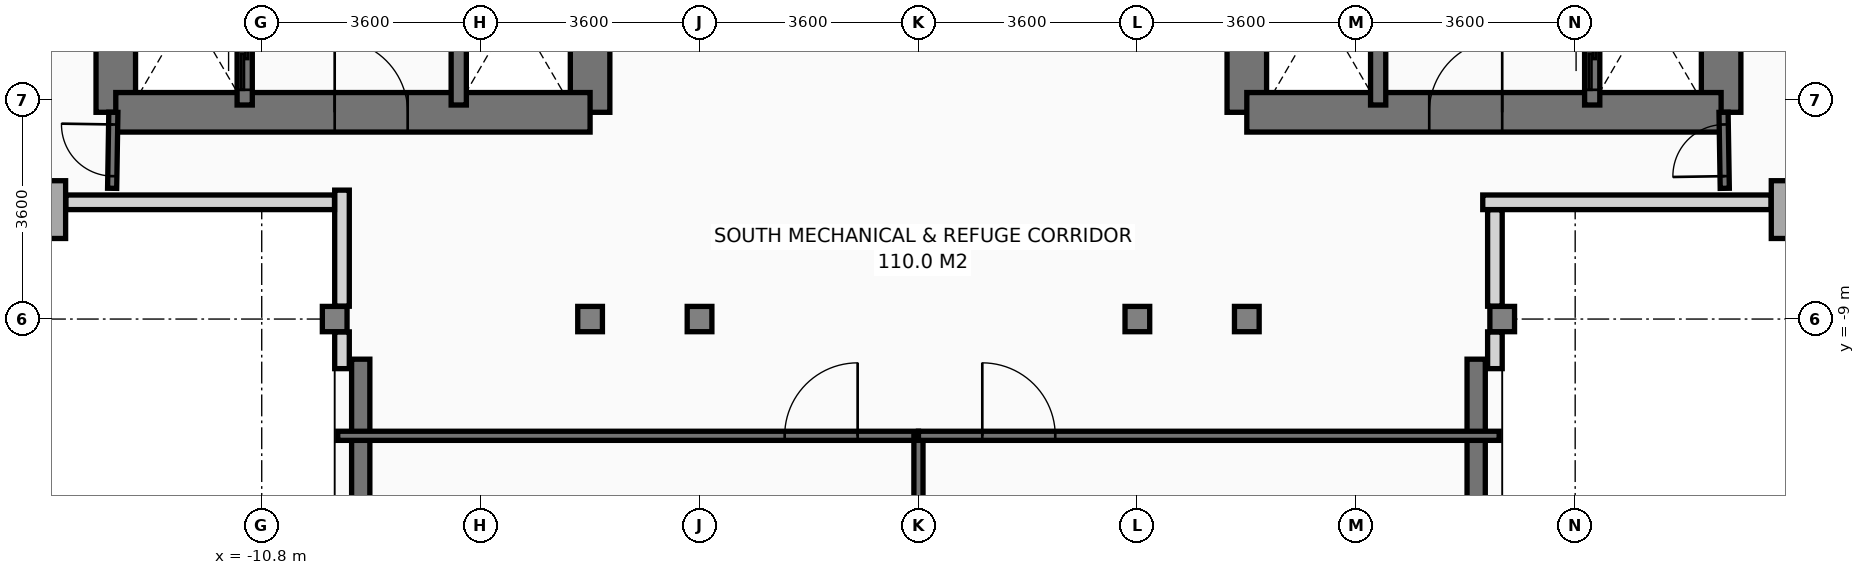
"""IFC4 building model, lengths in metres.
Left out: names, types, materials, properties, quantities, classifications, styles, units other than length and angle.
Written with IfcOpenShell. Run it as: python <this file> out.ifc"""

import sys

from ifc_helpers import new_model, si_unit, direction, frame, frame_2d, origin, origin_2d, place, context, subcontext, project, spatial, rectangle, i_section, extrude, source, transform, mapped, element, fill, save


model = new_model("IFC4")
c1 = context("Model", 3, precision=1e-05, world=origin(), true_north=direction((0.0, 1.0)))
c2 = subcontext(c1, "Body", "Model", "MODEL_VIEW")
j1 = project(units=[si_unit("LENGTHUNIT", "METRE"), si_unit("PLANEANGLEUNIT", "RADIAN")], contexts=[c1])
p1 = place(None, origin())
s1 = spatial("IfcSite", under=j1, at=p1, CompositionType="ELEMENT")
p2 = place(p1, origin())
s2 = spatial("IfcBuilding", under=s1, at=p2, CompositionType="ELEMENT")
p3 = place(p2, frame((0.0, 0.0, 25.2)))
s3 = spatial("IfcBuildingStorey", under=s2, at=p3, CompositionType="ELEMENT", Elevation=25.2)
m1 = source(origin(), c2, "Body", "SweptSolid", [
    extrude(rectangle(XDim=0.75, YDim=0.95, at=origin_2d()), origin(), (0.0, 0.0, 1.0), 5.2),
])
p4 = place(p3, frame((-14.4, -7.2, 0.0), z_axis=(0.0, 0.0, 1.0), x_axis=(1.0, 0.0, 0.0)))
e1 = element("IfcColumn", 1, at=p4, inside=s3, PredefinedType="COLUMN", context=c2, shape_type="MappedRepresentation", body=[
    mapped(m1, transform((0.0, 0.0, 0.0), x_axis=(1.0, 0.0, 0.0), y_axis=(0.0, 1.0, 0.0), z_axis=(0.0, 0.0, 1.0), scale=1.0)),
])
m2 = source(origin(), c2, "Body", "SweptSolid", [
    extrude(i_section(OverallWidth=0.406, OverallDepth=0.416, WebThickness=0.024, FlangeThickness=0.039, at=origin_2d()), origin(), (0.0, 0.0, 1.0), 5.2),
])
for number, where, z_axis, x_axis in (
    (2, (-9.6, -9.0, 0.0), (0.0, 0.0, 1.0), (1.0, 0.0, 0.0)),
    (3, (-5.4, -9.0, 0.0), (0.0, 0.0, 1.0), (1.0, 0.0, 0.0)),
    (4, (-3.6, -9.0, 0.0), (0.0, 0.0, 1.0), (1.0, 0.0, 0.0)),
    (5, (3.6, -9.0, 0.0), (0.0, 0.0, 1.0), (1.0, 0.0, 0.0)),
    (6, (5.4, -9.0, 0.0), (0.0, 0.0, 1.0), (1.0, 0.0, 0.0)),
    (7, (9.6, -9.0, 0.0), (0.0, 0.0, 1.0), (1.0, 0.0, 0.0)),
):
    element("IfcColumn", number, at=place(p3, frame(where, z_axis=z_axis, x_axis=x_axis)), inside=s3, PredefinedType="COLUMN", context=c2, shape_type="MappedRepresentation", body=[
        mapped(m2, transform((0.0, 0.0, 0.0), x_axis=(1.0, 0.0, 0.0), y_axis=(0.0, 1.0, 0.0), z_axis=(0.0, 0.0, 1.0), scale=1.0)),
    ])
p5 = place(p3, frame((14.4, -7.2, 0.0), z_axis=(0.0, 0.0, 1.0), x_axis=(1.0, 0.0, 0.0)))
e8 = element("IfcColumn", 8, at=p5, inside=s3, PredefinedType="COLUMN", context=c2, shape_type="MappedRepresentation", body=[
    mapped(m1, transform((0.0, 0.0, 0.0), x_axis=(1.0, 0.0, 0.0), y_axis=(0.0, 1.0, 0.0), z_axis=(0.0, 0.0, 1.0), scale=1.0)),
])
for number, where, z_axis, x_axis in (
    (9, (-9.172, -9.66, 0.0), (0.0, 0.0, 1.0), (0.0, -1.0, 0.0)),
    (10, (9.172, -13.83, 0.0), (0.0, 0.0, 1.0), (0.0, 1.0, 0.0)),
):
    element("IfcWall", number, at=place(p3, frame(where, z_axis=z_axis, x_axis=x_axis)), inside=s3, PredefinedType="SOLIDWALL", context=c2, shape_type="SweptSolid", body=[
        extrude(rectangle(XDim=4.17, YDim=0.3, at=frame_2d((2.085, 0.0))), origin(), (0.0, 0.0, 1.0), 5.2),
    ])
p6 = place(p3, frame((14.022, -7.08, 0.0), z_axis=(0.0, 0.0, 1.0), x_axis=(-1.0, 0.0, 0.0)))
e11 = element("IfcWall", 11, at=p6, inside=s3, PredefinedType="PARAPET", context=c2, shape_type="SweptSolid", body=[
    extrude(rectangle(XDim=4.742, YDim=0.24, at=frame_2d((2.371, 0.0))), origin(), (0.0, 0.0, 1.0), 1.15),
])
p7 = place(p3, frame((9.48, -7.203, 0.0), z_axis=(0.0, 0.0, 1.0), x_axis=(0.0, -1.0, 0.0)))
e12 = element("IfcWall", 12, at=p7, inside=s3, PredefinedType="PARAPET", context=c2, shape_type="SweptSolid", body=[
    extrude(rectangle(XDim=1.586, YDim=0.24, at=frame_2d((0.793, 0.0))), origin(), (0.0, 0.0, 1.0), 1.15),
])
for number, where, z_axis, x_axis in (
    (13, (9.48, -9.211, 0.0), (0.0, 0.0, 1.0), (0.0, -1.0, 0.0)),
    (14, (-9.48, -9.815, 0.0), (0.0, 0.0, 1.0), (0.0, 1.0, 0.0)),
):
    element("IfcWall", number, at=place(p3, frame(where, z_axis=z_axis, x_axis=x_axis)), inside=s3, PredefinedType="PARAPET", context=c2, shape_type="SweptSolid", body=[
        extrude(rectangle(XDim=0.604, YDim=0.24, at=frame_2d((0.302, 0.0))), origin(), (0.0, 0.0, 1.0), 1.15),
    ])
p8 = place(p3, frame((-9.48, -8.789, 0.0), z_axis=(0.0, 0.0, 1.0), x_axis=(0.0, 1.0, 0.0)))
e15 = element("IfcWall", 15, at=p8, inside=s3, PredefinedType="PARAPET", context=c2, shape_type="SweptSolid", body=[
    extrude(rectangle(XDim=1.909, YDim=0.24, at=frame_2d((0.955, 0.0))), origin(), (0.0, 0.0, 1.0), 1.15),
])
p9 = place(p3, frame((-9.603, -7.08, 0.0), z_axis=(0.0, 0.0, 1.0), x_axis=(-1.0, 0.0, 0.0)))
e16 = element("IfcWall", 16, at=p9, inside=s3, PredefinedType="PARAPET", context=c2, shape_type="SweptSolid", body=[
    extrude(rectangle(XDim=4.419, YDim=0.24, at=frame_2d((2.209, 0.0))), origin(), (0.0, 0.0, 1.0), 1.15),
])
p10 = place(p3, frame((-13.2, -5.6, 0.0), z_axis=(0.0, 0.0, 1.0), x_axis=(0.0, 1.0, 0.0)))
e17 = element("IfcWall", 17, at=p10, inside=s3, PredefinedType="SHEAR", context=c2, shape_type="SweptSolid", body=[
    extrude(rectangle(XDim=11.2, YDim=0.65, at=frame_2d((5.6, 0.0))), origin(), (0.0, 0.0, 1.0), 5.2),
])
p11 = place(p3, frame((-5.4, -5.6, 0.0), z_axis=(0.0, 0.0, 1.0), x_axis=(0.0, 1.0, 0.0)))
e18 = element("IfcWall", 18, at=p11, inside=s3, PredefinedType="SHEAR", context=c2, shape_type="SweptSolid", body=[
    extrude(rectangle(XDim=12.5, YDim=0.65, at=frame_2d((6.25, 0.0))), origin(), (0.0, 0.0, 1.0), 5.2),
])
p12 = place(p11, frame((4.55, 0.0, 0.0)))
e19 = element("IfcOpeningElement", 19, at=p12, cuts=e18, PredefinedType="OPENING", context=c2, shape_type="SweptSolid", body=[
    extrude(rectangle(XDim=1.2, YDim=2.2, at=frame_2d((0.6, 1.1))), frame((0.0, 0.335, 0.0), z_axis=(0.0, -1.0, 0.0), x_axis=(1.0, 0.0, 0.0)), (0.0, 0.0, 1.0), 0.67),
])
p13 = place(p3, frame((-13.2, -5.6, 0.0), z_axis=(0.0, 0.0, 1.0), x_axis=(1.0, 0.0, 0.0)))
e20 = element("IfcWall", 20, at=p13, inside=s3, PredefinedType="SHEAR", context=c2, shape_type="SweptSolid", body=[
    extrude(rectangle(XDim=7.8, YDim=0.65, at=frame_2d((3.9, 0.0))), origin(), (0.0, 0.0, 1.0), 5.2),
])
p14 = place(p13, frame((3.6, 0.0, 0.0)))
e21 = element("IfcOpeningElement", 21, at=p14, cuts=e20, PredefinedType="OPENING", context=c2, shape_type="SweptSolid", body=[
    extrude(rectangle(XDim=1.2, YDim=2.2, at=frame_2d((0.6, 1.1))), frame((0.0, 0.335, 0.0), z_axis=(0.0, -1.0, 0.0), x_axis=(1.0, 0.0, 0.0)), (0.0, 0.0, 1.0), 0.67),
])
p15 = place(p3, frame((13.2, -5.6, 0.0), z_axis=(0.0, 0.0, 1.0), x_axis=(0.0, 1.0, 0.0)))
e22 = element("IfcWall", 22, at=p15, inside=s3, PredefinedType="SHEAR", context=c2, shape_type="SweptSolid", body=[
    extrude(rectangle(XDim=11.2, YDim=0.65, at=frame_2d((5.6, 0.0))), origin(), (0.0, 0.0, 1.0), 5.2),
])
p16 = place(p3, frame((5.4, -5.6, 0.0), z_axis=(0.0, 0.0, 1.0), x_axis=(0.0, 1.0, 0.0)))
e23 = element("IfcWall", 23, at=p16, inside=s3, PredefinedType="SHEAR", context=c2, shape_type="SweptSolid", body=[
    extrude(rectangle(XDim=12.5, YDim=0.65, at=frame_2d((6.25, 0.0))), origin(), (0.0, 0.0, 1.0), 5.2),
])
p17 = place(p16, frame((4.55, 0.0, 0.0)))
e24 = element("IfcOpeningElement", 24, at=p17, cuts=e23, PredefinedType="OPENING", context=c2, shape_type="SweptSolid", body=[
    extrude(rectangle(XDim=1.2, YDim=2.2, at=frame_2d((0.6, 1.1))), frame((0.0, 0.335, 0.0), z_axis=(0.0, -1.0, 0.0), x_axis=(1.0, 0.0, 0.0)), (0.0, 0.0, 1.0), 0.67),
])
p18 = place(p16, frame((7.88, 0.0, 0.0)))
e25 = element("IfcOpeningElement", 25, at=p18, cuts=e23, PredefinedType="OPENING", context=c2, shape_type="SweptSolid", body=[
    extrude(rectangle(XDim=0.8, YDim=2.1, at=frame_2d((0.4, 1.05))), frame((0.0, 0.335, 0.0), z_axis=(0.0, -1.0, 0.0), x_axis=(1.0, 0.0, 0.0)), (0.0, 0.0, 1.0), 0.67),
])
p19 = place(p3, frame((5.4, -5.6, 0.0), z_axis=(0.0, 0.0, 1.0), x_axis=(1.0, 0.0, 0.0)))
e26 = element("IfcWall", 26, at=p19, inside=s3, PredefinedType="SHEAR", context=c2, shape_type="SweptSolid", body=[
    extrude(rectangle(XDim=7.8, YDim=0.65, at=frame_2d((3.9, 0.0))), origin(), (0.0, 0.0, 1.0), 5.2),
])
p20 = place(p19, frame((3.0, 0.0, 0.0)))
e27 = element("IfcOpeningElement", 27, at=p20, cuts=e26, PredefinedType="OPENING", context=c2, shape_type="SweptSolid", body=[
    extrude(rectangle(XDim=1.2, YDim=2.2, at=frame_2d((0.6, 1.1))), frame((0.0, 0.335, 0.0), z_axis=(0.0, -1.0, 0.0), x_axis=(1.0, 0.0, 0.0)), (0.0, 0.0, 1.0), 0.67),
])
p21 = place(p3, frame((-11.08, -5.48, 0.0), z_axis=(0.0, 0.0, 1.0), x_axis=(0.0, 1.0, 0.0)))
e28 = element("IfcWall", 28, at=p21, inside=s3, PredefinedType="SOLIDWALL", context=c2, shape_type="SweptSolid", body=[
    extrude(rectangle(XDim=1.6, YDim=0.25, at=frame_2d((0.8, 0.0))), origin(), (0.0, 0.0, 1.0), 5.2),
])
p22 = place(p21, frame((0.25, 0.0, 0.0)))
e29 = element("IfcOpeningElement", 29, at=p22, cuts=e28, PredefinedType="OPENING", context=c2, shape_type="SweptSolid", body=[
    extrude(rectangle(XDim=1.1, YDim=2.2, at=frame_2d((0.55, 1.1))), frame((0.0, 0.135, 0.0), z_axis=(0.0, -1.0, 0.0), x_axis=(1.0, 0.0, 0.0)), (0.0, 0.0, 1.0), 0.27),
])
p23 = place(p3, frame((11.08, -5.48, 0.0), z_axis=(0.0, 0.0, 1.0), x_axis=(0.0, 1.0, 0.0)))
e30 = element("IfcWall", 30, at=p23, inside=s3, PredefinedType="SOLIDWALL", context=c2, shape_type="SweptSolid", body=[
    extrude(rectangle(XDim=1.6, YDim=0.25, at=frame_2d((0.8, 0.0))), origin(), (0.0, 0.0, 1.0), 5.2),
])
p24 = place(p23, frame((0.25, 0.0, 0.0)))
e31 = element("IfcOpeningElement", 31, at=p24, cuts=e30, PredefinedType="OPENING", context=c2, shape_type="SweptSolid", body=[
    extrude(rectangle(XDim=1.1, YDim=2.2, at=frame_2d((0.55, 1.1))), frame((0.0, 0.135, 0.0), z_axis=(0.0, -1.0, 0.0), x_axis=(1.0, 0.0, 0.0)), (0.0, 0.0, 1.0), 0.27),
])
for number, where, z_axis, x_axis in (
    (32, (-7.56, -5.48, 0.0), (0.0, 0.0, 1.0), (0.0, 1.0, 0.0)),
    (33, (7.56, -5.48, 0.0), (0.0, 0.0, 1.0), (0.0, 1.0, 0.0)),
):
    element("IfcWall", number, at=place(p3, frame(where, z_axis=z_axis, x_axis=x_axis)), inside=s3, PredefinedType="SOLIDWALL", context=c2, shape_type="SweptSolid", body=[
        extrude(rectangle(XDim=1.6, YDim=0.25, at=frame_2d((0.8, 0.0))), origin(), (0.0, 0.0, 1.0), 5.2),
    ])
p25 = place(p3, frame((-13.26, -6.85, 0.0), z_axis=(0.0, 0.0, 1.0), x_axis=(0.016013571389, 0.999871774545, 0.0)))
e34 = element("IfcWall", 34, at=p25, inside=s3, PredefinedType="PARTITIONING", context=c2, shape_type="SweptSolid", body=[
    extrude(rectangle(XDim=1.25, YDim=0.15, at=frame_2d((0.625, 0.0))), origin(), (0.0, 0.0, 1.0), 5.2),
])
p26 = place(p25, frame((0.2, 0.0, 0.0)))
e35 = element("IfcOpeningElement", 35, at=p26, cuts=e34, PredefinedType="OPENING", context=c2, shape_type="SweptSolid", body=[
    extrude(rectangle(XDim=0.85, YDim=2.1, at=frame_2d((0.425, 1.05))), frame((0.0, 0.085, 0.0), z_axis=(0.0, -1.0, 0.0), x_axis=(1.0, 0.0, 0.0)), (0.0, 0.0, 1.0), 0.17),
])
p27 = place(p3, frame((13.26, -6.85, 0.0), z_axis=(0.0, 0.0, 1.0), x_axis=(-0.016013571389, 0.999871774545, 0.0)))
e36 = element("IfcWall", 36, at=p27, inside=s3, PredefinedType="PARTITIONING", context=c2, shape_type="SweptSolid", body=[
    extrude(rectangle(XDim=1.25, YDim=0.15, at=frame_2d((0.625, 0.0))), origin(), (0.0, 0.0, 1.0), 5.2),
])
p28 = place(p27, frame((0.2, 0.0, 0.0)))
e37 = element("IfcOpeningElement", 37, at=p28, cuts=e36, PredefinedType="OPENING", context=c2, shape_type="SweptSolid", body=[
    extrude(rectangle(XDim=0.85, YDim=2.1, at=frame_2d((0.425, 1.05))), frame((0.0, 0.085, 0.0), z_axis=(0.0, -1.0, 0.0), x_axis=(1.0, 0.0, 0.0)), (0.0, 0.0, 1.0), 0.17),
])
p29 = place(p3, frame((-9.55, -10.92, 0.0), z_axis=(0.0, 0.0, 1.0), x_axis=(1.0, 0.0, 0.0)))
e38 = element("IfcWall", 38, at=p29, inside=s3, PredefinedType="PARTITIONING", context=c2, shape_type="SweptSolid", body=[
    extrude(rectangle(XDim=9.55, YDim=0.15, at=frame_2d((4.775, 0.0))), origin(), (0.0, 0.0, 1.0), 5.2),
])
p30 = place(p29, frame((7.35, 0.0, 0.0)))
e39 = element("IfcOpeningElement", 39, at=p30, cuts=e38, PredefinedType="OPENING", context=c2, shape_type="SweptSolid", body=[
    extrude(rectangle(XDim=1.2, YDim=2.2, at=frame_2d((0.6, 1.1))), frame((0.0, 0.085, 0.0), z_axis=(0.0, -1.0, 0.0), x_axis=(1.0, 0.0, 0.0)), (0.0, 0.0, 1.0), 0.17),
])
p31 = place(p3, frame((0.0, -22.85, 0.0), z_axis=(0.0, 0.0, 1.0), x_axis=(0.0, 1.0, 0.0)))
e40 = element("IfcWall", 40, at=p31, inside=s3, PredefinedType="PARTITIONING", context=c2, shape_type="SweptSolid", body=[
    extrude(rectangle(XDim=11.93, YDim=0.15, at=frame_2d((5.965, 0.0))), origin(), (0.0, 0.0, 1.0), 4.386),
])
p32 = place(p3, frame((0.0, -10.92, 0.0), z_axis=(0.0, 0.0, 1.0), x_axis=(1.0, 0.0, 0.0)))
e41 = element("IfcWall", 41, at=p32, inside=s3, PredefinedType="PARTITIONING", context=c2, shape_type="SweptSolid", body=[
    extrude(rectangle(XDim=9.55, YDim=0.15, at=frame_2d((4.775, 0.0))), origin(), (0.0, 0.0, 1.0), 5.2),
])
p33 = place(p32, frame((1.05, 0.0, 0.0)))
e42 = element("IfcOpeningElement", 42, at=p33, cuts=e41, PredefinedType="OPENING", context=c2, shape_type="SweptSolid", body=[
    extrude(rectangle(XDim=1.2, YDim=2.2, at=frame_2d((0.6, 1.1))), frame((0.0, 0.085, 0.0), z_axis=(0.0, -1.0, 0.0), x_axis=(1.0, 0.0, 0.0)), (0.0, 0.0, 1.0), 0.17),
])
m3 = source(origin(), c2, "Body", "SweptSolid", [
    extrude(rectangle(XDim=1.2, YDim=2.2, at=frame_2d((0.6, 1.1))), frame((0.0, 0.025, 0.0), z_axis=(0.0, -1.0, 0.0), x_axis=(1.0, 0.0, 0.0)), (0.0, 0.0, 1.0), 0.05),
])
p34 = place(p14, origin())
e43 = element("IfcDoor", 43, at=p34, inside=s3, OperationType="SINGLE_SWING_LEFT", PredefinedType="DOOR", context=c2, shape_type="MappedRepresentation", body=[
    mapped(m3, transform((0.0, 0.0, 0.0), x_axis=(1.0, 0.0, 0.0), y_axis=(0.0, 1.0, 0.0), z_axis=(0.0, 0.0, 1.0), scale=1.0)),
])
fill(e21, e43)
p35 = place(p20, origin())
e44 = element("IfcDoor", 44, at=p35, inside=s3, OperationType="SINGLE_SWING_RIGHT", PredefinedType="DOOR", context=c2, shape_type="MappedRepresentation", body=[
    mapped(m3, transform((0.0, 0.0, 0.0), x_axis=(1.0, 0.0, 0.0), y_axis=(0.0, 1.0, 0.0), z_axis=(0.0, 0.0, 1.0), scale=1.0)),
])
fill(e27, e44)
m4 = source(origin(), c2, "Body", "SweptSolid", [
    extrude(rectangle(XDim=1.1, YDim=2.2, at=frame_2d((0.55, 1.1))), frame((0.0, 0.025, 0.0), z_axis=(0.0, -1.0, 0.0), x_axis=(1.0, 0.0, 0.0)), (0.0, 0.0, 1.0), 0.05),
])
p36 = place(p22, origin())
e45 = element("IfcDoor", 45, at=p36, inside=s3, OperationType="SLIDING_TO_LEFT", PredefinedType="DOOR", context=c2, shape_type="MappedRepresentation", body=[
    mapped(m4, transform((0.0, 0.0, 0.0), x_axis=(1.0, 0.0, 0.0), y_axis=(0.0, 1.0, 0.0), z_axis=(0.0, 0.0, 1.0), scale=1.0)),
])
fill(e29, e45)
p37 = place(p24, origin())
e46 = element("IfcDoor", 46, at=p37, inside=s3, OperationType="SLIDING_TO_LEFT", PredefinedType="DOOR", context=c2, shape_type="MappedRepresentation", body=[
    mapped(m4, transform((0.0, 0.0, 0.0), x_axis=(1.0, 0.0, 0.0), y_axis=(0.0, 1.0, 0.0), z_axis=(0.0, 0.0, 1.0), scale=1.0)),
])
fill(e31, e46)
m5 = source(origin(), c2, "Body", "SweptSolid", [
    extrude(rectangle(XDim=0.85, YDim=2.1, at=frame_2d((0.425, 1.05))), frame((0.0, 0.025, 0.0), z_axis=(0.0, -1.0, 0.0), x_axis=(1.0, 0.0, 0.0)), (0.0, 0.0, 1.0), 0.05),
])
p38 = place(p26, origin())
e47 = element("IfcDoor", 47, at=p38, inside=s3, OperationType="SINGLE_SWING_RIGHT", PredefinedType="DOOR", context=c2, shape_type="MappedRepresentation", body=[
    mapped(m5, transform((0.0, 0.0, 0.0), x_axis=(1.0, 0.0, 0.0), y_axis=(0.0, 1.0, 0.0), z_axis=(0.0, 0.0, 1.0), scale=1.0)),
])
fill(e35, e47)
p39 = place(p28, origin())
e48 = element("IfcDoor", 48, at=p39, inside=s3, OperationType="SINGLE_SWING_LEFT", PredefinedType="DOOR", context=c2, shape_type="MappedRepresentation", body=[
    mapped(m5, transform((0.0, 0.0, 0.0), x_axis=(1.0, 0.0, 0.0), y_axis=(0.0, 1.0, 0.0), z_axis=(0.0, 0.0, 1.0), scale=1.0)),
])
fill(e37, e48)
p40 = place(p30, origin())
e49 = element("IfcDoor", 49, at=p40, inside=s3, OperationType="SINGLE_SWING_RIGHT", PredefinedType="DOOR", context=c2, shape_type="MappedRepresentation", body=[
    mapped(m3, transform((0.0, 0.0, 0.0), x_axis=(1.0, 0.0, 0.0), y_axis=(0.0, 1.0, 0.0), z_axis=(0.0, 0.0, 1.0), scale=1.0)),
])
fill(e39, e49)
p41 = place(p33, origin())
e50 = element("IfcDoor", 50, at=p41, inside=s3, OperationType="SINGLE_SWING_LEFT", PredefinedType="DOOR", context=c2, shape_type="MappedRepresentation", body=[
    mapped(m3, transform((0.0, 0.0, 0.0), x_axis=(1.0, 0.0, 0.0), y_axis=(0.0, 1.0, 0.0), z_axis=(0.0, 0.0, 1.0), scale=1.0)),
])
fill(e42, e50)
save(model, sys.argv[1])
